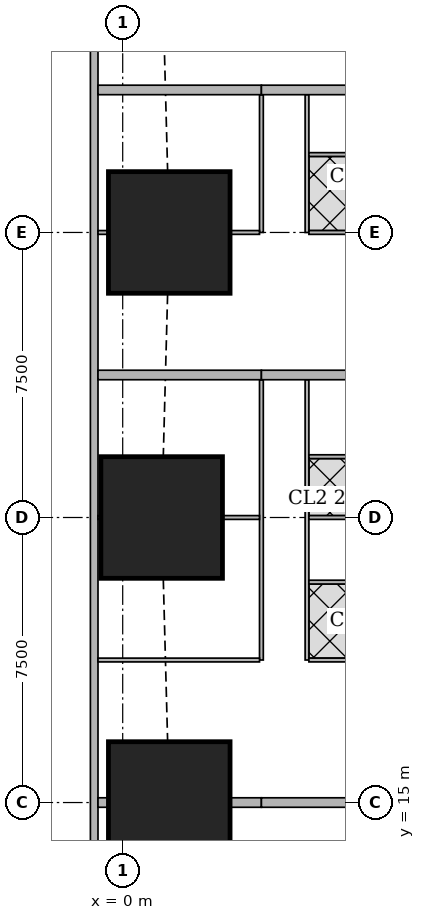
"""IFC4 building model, lengths in metres.
Left out: names, types, materials, properties, quantities, classifications, styles, units other than length and angle.
Written with IfcOpenShell. Run it as: python <this file> out.ifc"""

import sys

from ifc_helpers import new_model, si_unit, direction, frame, frame_2d, origin, origin_2d, place, context, subcontext, project, spatial, rectangle, extrude, element, fill, save


model = new_model("IFC4")
c1 = context("Model", 3, precision=1e-05, world=origin(), true_north=direction((0.0, 1.0)))
c2 = subcontext(c1, "Body", "Model", "MODEL_VIEW")
j1 = project(units=[si_unit("LENGTHUNIT", "METRE"), si_unit("PLANEANGLEUNIT", "RADIAN")], contexts=[c1])
p1 = place(None, origin())
s1 = spatial("IfcSite", under=j1, at=p1, CompositionType="ELEMENT")
p2 = place(p1, origin())
s2 = spatial("IfcBuilding", under=s1, at=p2, CompositionType="ELEMENT")
p3 = place(p2, frame((0.0, 0.0, 20.0)))
s3 = spatial("IfcBuildingStorey", under=s2, at=p3, CompositionType="ELEMENT", Elevation=20.0)
p4 = place(p3, frame((1.225, 15.0, 0.0), z_axis=(0.0, 0.0, 1.0), x_axis=(1.0, 0.0, 0.0)))
e1 = element("IfcColumn", 1, at=p4, inside=s3, PredefinedType="COLUMN", context=c2, shape_type="SweptSolid", body=[
    extrude(rectangle(XDim=3.2, YDim=3.2, at=origin_2d()), origin(), (0.0, 0.0, 1.0), 3.75),
])
p5 = place(p3, frame((1.025, 22.5, -0.3), z_axis=(0.0, 0.0, 1.0), x_axis=(1.0, 0.0, 0.0)))
e2 = element("IfcColumn", 2, at=p5, inside=s3, PredefinedType="COLUMN", context=c2, shape_type="SweptSolid", body=[
    extrude(rectangle(XDim=3.2, YDim=3.2, at=origin_2d()), origin(), (0.0, 0.0, 1.0), 4.05),
])
p6 = place(p3, frame((1.225, 30.0, 0.0), z_axis=(0.0, 0.0, 1.0), x_axis=(1.0, 0.0, 0.0)))
e3 = element("IfcColumn", 3, at=p6, inside=s3, PredefinedType="COLUMN", context=c2, shape_type="SweptSolid", body=[
    extrude(rectangle(XDim=3.2, YDim=3.2, at=origin_2d()), origin(), (0.0, 0.0, 1.0), 3.75),
])
p7 = place(p3, frame((-0.75, 42.837, 0.0), z_axis=(0.0, 0.0, 1.0), x_axis=(0.0, -1.0, 0.0)))
e4 = element("IfcWall", 4, at=p7, inside=s3, PredefinedType="SOLIDWALL", context=c2, shape_type="SweptSolid", body=[
    extrude(rectangle(XDim=40.674, YDim=0.2, at=frame_2d((20.337, 0.0))), origin(), (0.0, 0.0, 1.0), 3.5),
])
p8 = place(p7, frame((1.78, 0.0, 0.9)))
e5 = element("IfcOpeningElement", 5, at=p8, cuts=e4, PredefinedType="OPENING", context=c2, shape_type="SweptSolid", body=[
    extrude(rectangle(XDim=1.8, YDim=1.5, at=frame_2d((0.9, 0.75))), frame((0.0, 0.11, 0.0), z_axis=(0.0, -1.0, 0.0), x_axis=(1.0, 0.0, 0.0)), (0.0, 0.0, 1.0), 0.22),
])
p9 = place(p7, frame((6.312, 0.0, 0.9)))
e6 = element("IfcOpeningElement", 6, at=p9, cuts=e4, PredefinedType="OPENING", context=c2, shape_type="SweptSolid", body=[
    extrude(rectangle(XDim=1.8, YDim=1.5, at=frame_2d((0.9, 0.75))), frame((0.0, 0.11, 0.0), z_axis=(0.0, -1.0, 0.0), x_axis=(1.0, 0.0, 0.0)), (0.0, 0.0, 1.0), 0.22),
])
p10 = place(p7, frame((10.062, 0.0, 0.9)))
e7 = element("IfcOpeningElement", 7, at=p10, cuts=e4, PredefinedType="OPENING", context=c2, shape_type="SweptSolid", body=[
    extrude(rectangle(XDim=1.8, YDim=1.5, at=frame_2d((0.9, 0.75))), frame((0.0, 0.11, 0.0), z_axis=(0.0, -1.0, 0.0), x_axis=(1.0, 0.0, 0.0)), (0.0, 0.0, 1.0), 0.22),
])
p11 = place(p7, frame((13.812, 0.0, 0.9)))
e8 = element("IfcOpeningElement", 8, at=p11, cuts=e4, PredefinedType="OPENING", context=c2, shape_type="SweptSolid", body=[
    extrude(rectangle(XDim=1.8, YDim=1.5, at=frame_2d((0.9, 0.75))), frame((0.0, 0.11, 0.0), z_axis=(0.0, -1.0, 0.0), x_axis=(1.0, 0.0, 0.0)), (0.0, 0.0, 1.0), 0.22),
])
p12 = place(p7, frame((17.562, 0.0, 0.9)))
e9 = element("IfcOpeningElement", 9, at=p12, cuts=e4, PredefinedType="OPENING", context=c2, shape_type="SweptSolid", body=[
    extrude(rectangle(XDim=1.8, YDim=1.5, at=frame_2d((0.9, 0.75))), frame((0.0, 0.11, 0.0), z_axis=(0.0, -1.0, 0.0), x_axis=(1.0, 0.0, 0.0)), (0.0, 0.0, 1.0), 0.22),
])
p13 = place(p7, frame((21.312, 0.0, 0.9)))
e10 = element("IfcOpeningElement", 10, at=p13, cuts=e4, PredefinedType="OPENING", context=c2, shape_type="SweptSolid", body=[
    extrude(rectangle(XDim=1.8, YDim=1.5, at=frame_2d((0.9, 0.75))), frame((0.0, 0.11, 0.0), z_axis=(0.0, -1.0, 0.0), x_axis=(1.0, 0.0, 0.0)), (0.0, 0.0, 1.0), 0.22),
])
p14 = place(p7, frame((25.062, 0.0, 0.9)))
e11 = element("IfcOpeningElement", 11, at=p14, cuts=e4, PredefinedType="OPENING", context=c2, shape_type="SweptSolid", body=[
    extrude(rectangle(XDim=1.8, YDim=1.5, at=frame_2d((0.9, 0.75))), frame((0.0, 0.11, 0.0), z_axis=(0.0, -1.0, 0.0), x_axis=(1.0, 0.0, 0.0)), (0.0, 0.0, 1.0), 0.22),
])
p15 = place(p7, frame((28.812, 0.0, 0.9)))
e12 = element("IfcOpeningElement", 12, at=p15, cuts=e4, PredefinedType="OPENING", context=c2, shape_type="SweptSolid", body=[
    extrude(rectangle(XDim=1.8, YDim=1.5, at=frame_2d((0.9, 0.75))), frame((0.0, 0.11, 0.0), z_axis=(0.0, -1.0, 0.0), x_axis=(1.0, 0.0, 0.0)), (0.0, 0.0, 1.0), 0.22),
])
p16 = place(p7, frame((32.562, 0.0, 0.9)))
e13 = element("IfcOpeningElement", 13, at=p16, cuts=e4, PredefinedType="OPENING", context=c2, shape_type="SweptSolid", body=[
    extrude(rectangle(XDim=1.8, YDim=1.5, at=frame_2d((0.9, 0.75))), frame((0.0, 0.11, 0.0), z_axis=(0.0, -1.0, 0.0), x_axis=(1.0, 0.0, 0.0)), (0.0, 0.0, 1.0), 0.22),
])
p17 = place(p7, frame((37.094, 0.0, 0.9)))
e14 = element("IfcOpeningElement", 14, at=p17, cuts=e4, PredefinedType="OPENING", context=c2, shape_type="SweptSolid", body=[
    extrude(rectangle(XDim=1.8, YDim=1.5, at=frame_2d((0.9, 0.75))), frame((0.0, 0.11, 0.0), z_axis=(0.0, -1.0, 0.0), x_axis=(1.0, 0.0, 0.0)), (0.0, 0.0, 1.0), 0.22),
])
p18 = place(p3, frame((3.65, 18.75, 0.0), z_axis=(0.0, 0.0, 1.0), x_axis=(0.0, 1.0, 0.0)))
e15 = element("IfcWall", 15, at=p18, inside=s3, PredefinedType="PARTITIONING", context=c2, shape_type="SweptSolid", body=[
    extrude(rectangle(XDim=7.375, YDim=0.1, at=frame_2d((3.688, 0.0))), origin(), (0.0, 0.0, 1.0), 3.5),
])
p19 = place(p18, frame((0.2, 0.0, 0.0)))
e16 = element("IfcOpeningElement", 16, at=p19, cuts=e15, PredefinedType="OPENING", context=c2, shape_type="SweptSolid", body=[
    extrude(rectangle(XDim=0.9, YDim=2.1, at=frame_2d((0.45, 1.05))), frame((0.0, 0.06, 0.0), z_axis=(0.0, -1.0, 0.0), x_axis=(1.0, 0.0, 0.0)), (0.0, 0.0, 1.0), 0.12),
])
p20 = place(p18, frame((5.4, 0.0, 0.0)))
e17 = element("IfcOpeningElement", 17, at=p20, cuts=e15, PredefinedType="OPENING", context=c2, shape_type="SweptSolid", body=[
    extrude(rectangle(XDim=0.9, YDim=2.1, at=frame_2d((0.45, 1.05))), frame((0.0, 0.06, 0.0), z_axis=(0.0, -1.0, 0.0), x_axis=(1.0, 0.0, 0.0)), (0.0, 0.0, 1.0), 0.12),
])
p21 = place(p3, frame((4.85, 18.75, 0.0), z_axis=(0.0, 0.0, 1.0), x_axis=(0.0, 1.0, 0.0)))
e18 = element("IfcWall", 18, at=p21, inside=s3, PredefinedType="PARTITIONING", context=c2, shape_type="SweptSolid", body=[
    extrude(rectangle(XDim=7.375, YDim=0.1, at=frame_2d((3.688, 0.0))), origin(), (0.0, 0.0, 1.0), 3.5),
])
p22 = place(p21, frame((0.575, 0.0, 0.0)))
e19 = element("IfcOpeningElement", 19, at=p22, cuts=e18, PredefinedType="OPENING", context=c2, shape_type="SweptSolid", body=[
    extrude(rectangle(XDim=0.9, YDim=2.1, at=frame_2d((0.45, 1.05))), frame((0.0, 0.06, 0.0), z_axis=(0.0, -1.0, 0.0), x_axis=(1.0, 0.0, 0.0)), (0.0, 0.0, 1.0), 0.12),
])
p23 = place(p21, frame((4.1, 0.0, 0.0)))
e20 = element("IfcOpeningElement", 20, at=p23, cuts=e18, PredefinedType="OPENING", context=c2, shape_type="SweptSolid", body=[
    extrude(rectangle(XDim=0.9, YDim=2.1, at=frame_2d((0.45, 1.05))), frame((0.0, 0.06, 0.0), z_axis=(0.0, -1.0, 0.0), x_axis=(1.0, 0.0, 0.0)), (0.0, 0.0, 1.0), 0.12),
])
p24 = place(p21, frame((2.45, 0.0, 0.0)))
e21 = element("IfcOpeningElement", 21, at=p24, cuts=e18, PredefinedType="OPENING", context=c2, shape_type="SweptSolid", body=[
    extrude(rectangle(XDim=0.9, YDim=2.1, at=frame_2d((0.45, 1.05))), frame((0.0, 0.06, 0.0), z_axis=(0.0, -1.0, 0.0), x_axis=(1.0, 0.0, 0.0)), (0.0, 0.0, 1.0), 0.12),
])
p25 = place(p21, frame((5.975, 0.0, 0.0)))
e22 = element("IfcOpeningElement", 22, at=p25, cuts=e18, PredefinedType="OPENING", context=c2, shape_type="SweptSolid", body=[
    extrude(rectangle(XDim=0.9, YDim=2.1, at=frame_2d((0.45, 1.05))), frame((0.0, 0.06, 0.0), z_axis=(0.0, -1.0, 0.0), x_axis=(1.0, 0.0, 0.0)), (0.0, 0.0, 1.0), 0.12),
])
p26 = place(p3, frame((-0.65, 18.75, 0.0), z_axis=(0.0, 0.0, 1.0), x_axis=(1.0, 0.0, 0.0)))
e23 = element("IfcWall", 23, at=p26, inside=s3, PredefinedType="PARTITIONING", context=c2, shape_type="SweptSolid", body=[
    extrude(rectangle(XDim=4.25, YDim=0.1, at=frame_2d((2.125, 0.0))), origin(), (0.0, 0.0, 1.0), 2.05),
])
p27 = place(p3, frame((-0.65, 22.5, 0.0), z_axis=(0.0, 0.0, 1.0), x_axis=(1.0, 0.0, 0.0)))
e24 = element("IfcWall", 24, at=p27, inside=s3, PredefinedType="PARTITIONING", context=c2, shape_type="SweptSolid", body=[
    extrude(rectangle(XDim=0.074, YDim=0.1, at=frame_2d((0.037, 0.0))), origin(), (0.0, 0.0, 1.0), 3.5),
])
p28 = place(p3, frame((2.626, 22.5, 0.0), z_axis=(0.0, 0.0, 1.0), x_axis=(1.0, 0.0, 0.0)))
e25 = element("IfcWall", 25, at=p28, inside=s3, PredefinedType="PARTITIONING", context=c2, shape_type="SweptSolid", body=[
    extrude(rectangle(XDim=0.974, YDim=0.1, at=frame_2d((0.487, 0.0))), origin(), (0.0, 0.0, 1.0), 3.5),
])
p29 = place(p3, frame((4.9, 18.75, 0.0), z_axis=(0.0, 0.0, 1.0), x_axis=(1.0, 0.0, 0.0)))
e26 = element("IfcWall", 26, at=p29, inside=s3, PredefinedType="PARTITIONING", context=c2, shape_type="SweptSolid", body=[
    extrude(rectangle(XDim=3.525, YDim=0.1, at=frame_2d((1.763, 0.0))), origin(), (0.0, 0.0, 1.0), 3.5),
])
p30 = place(p3, frame((4.9, 22.5, 0.0), z_axis=(0.0, 0.0, 1.0), x_axis=(1.0, 0.0, 0.0)))
e27 = element("IfcWall", 27, at=p30, inside=s3, PredefinedType="PARTITIONING", context=c2, shape_type="SweptSolid", body=[
    extrude(rectangle(XDim=1.399, YDim=0.1, at=frame_2d((0.7, 0.0))), origin(), (0.0, 0.0, 1.0), 3.5),
])
for number, where, z_axis, x_axis in (
    (28, (4.9, 20.8, 0.0), (0.0, 0.0, 1.0), (1.0, 0.0, 0.0)),
    (29, (4.9, 24.1, 0.0), (0.0, 0.0, 1.0), (1.0, 0.0, 0.0)),
):
    element("IfcWall", number, at=place(p3, frame(where, z_axis=z_axis, x_axis=x_axis)), inside=s3, PredefinedType="PARTITIONING", context=c2, shape_type="SweptSolid", body=[
        extrude(rectangle(XDim=3.525, YDim=0.1, at=frame_2d((1.763, 0.0))), origin(), (0.0, 0.0, 1.0), 3.5),
    ])
p31 = place(p3, frame((-0.65, 15.0, 0.0), z_axis=(0.0, 0.0, 1.0), x_axis=(1.0, 0.0, 0.0)))
e30 = element("IfcWall", 30, at=p31, inside=s3, PredefinedType="SOLIDWALL", context=c2, shape_type="SweptSolid", body=[
    extrude(rectangle(XDim=0.274, YDim=0.25, at=frame_2d((0.137, 0.0))), origin(), (0.0, 0.0, 1.0), 2.05),
])
p32 = place(p3, frame((2.826, 15.0, 0.0), z_axis=(0.0, 0.0, 1.0), x_axis=(1.0, 0.0, 0.0)))
e31 = element("IfcWall", 31, at=p32, inside=s3, PredefinedType="SOLIDWALL", context=c2, shape_type="SweptSolid", body=[
    extrude(rectangle(XDim=0.824, YDim=0.25, at=frame_2d((0.412, 0.0))), origin(), (0.0, 0.0, 1.0), 2.05),
])
p33 = place(p3, frame((3.65, 15.0, 0.0), z_axis=(0.0, 0.0, 1.0), x_axis=(1.0, 0.0, 0.0)))
e32 = element("IfcWall", 32, at=p33, inside=s3, PredefinedType="SOLIDWALL", context=c2, shape_type="SweptSolid", body=[
    extrude(rectangle(XDim=2.649, YDim=0.25, at=frame_2d((1.325, 0.0))), origin(), (0.0, 0.0, 1.0), 3.5),
])
p34 = place(p3, frame((3.65, 30.0, 0.0), z_axis=(0.0, 0.0, 1.0), x_axis=(0.0, 1.0, 0.0)))
e33 = element("IfcWall", 33, at=p34, inside=s3, PredefinedType="PARTITIONING", context=c2, shape_type="SweptSolid", body=[
    extrude(rectangle(XDim=3.625, YDim=0.1, at=frame_2d((1.812, 0.0))), origin(), (0.0, 0.0, 1.0), 3.5),
])
p35 = place(p34, frame((1.65, 0.0, 0.0)))
e34 = element("IfcOpeningElement", 34, at=p35, cuts=e33, PredefinedType="OPENING", context=c2, shape_type="SweptSolid", body=[
    extrude(rectangle(XDim=0.9, YDim=2.1, at=frame_2d((0.45, 1.05))), frame((0.0, 0.06, 0.0), z_axis=(0.0, -1.0, 0.0), x_axis=(1.0, 0.0, 0.0)), (0.0, 0.0, 1.0), 0.12),
])
p36 = place(p3, frame((4.85, 30.0, 0.0), z_axis=(0.0, 0.0, 1.0), x_axis=(0.0, 1.0, 0.0)))
e35 = element("IfcWall", 35, at=p36, inside=s3, PredefinedType="PARTITIONING", context=c2, shape_type="SweptSolid", body=[
    extrude(rectangle(XDim=3.625, YDim=0.1, at=frame_2d((1.812, 0.0))), origin(), (0.0, 0.0, 1.0), 3.5),
])
p37 = place(p36, frame((0.575, 0.0, 0.0)))
e36 = element("IfcOpeningElement", 36, at=p37, cuts=e35, PredefinedType="OPENING", context=c2, shape_type="SweptSolid", body=[
    extrude(rectangle(XDim=0.9, YDim=2.1, at=frame_2d((0.45, 1.05))), frame((0.0, 0.06, 0.0), z_axis=(0.0, -1.0, 0.0), x_axis=(1.0, 0.0, 0.0)), (0.0, 0.0, 1.0), 0.12),
])
p38 = place(p36, frame((2.45, 0.0, 0.0)))
e37 = element("IfcOpeningElement", 37, at=p38, cuts=e35, PredefinedType="OPENING", context=c2, shape_type="SweptSolid", body=[
    extrude(rectangle(XDim=0.9, YDim=2.1, at=frame_2d((0.45, 1.05))), frame((0.0, 0.06, 0.0), z_axis=(0.0, -1.0, 0.0), x_axis=(1.0, 0.0, 0.0)), (0.0, 0.0, 1.0), 0.12),
])
p39 = place(p3, frame((-0.65, 30.0, 0.0), z_axis=(0.0, 0.0, 1.0), x_axis=(1.0, 0.0, 0.0)))
e38 = element("IfcWall", 38, at=p39, inside=s3, PredefinedType="PARTITIONING", context=c2, shape_type="SweptSolid", body=[
    extrude(rectangle(XDim=0.274, YDim=0.1, at=frame_2d((0.137, 0.0))), origin(), (0.0, 0.0, 1.0), 3.5),
])
p40 = place(p3, frame((2.826, 30.0, 0.0), z_axis=(0.0, 0.0, 1.0), x_axis=(1.0, 0.0, 0.0)))
e39 = element("IfcWall", 39, at=p40, inside=s3, PredefinedType="PARTITIONING", context=c2, shape_type="SweptSolid", body=[
    extrude(rectangle(XDim=0.774, YDim=0.1, at=frame_2d((0.387, 0.0))), origin(), (0.0, 0.0, 1.0), 3.5),
])
p41 = place(p3, frame((4.9, 30.0, 0.0), z_axis=(0.0, 0.0, 1.0), x_axis=(1.0, 0.0, 0.0)))
e40 = element("IfcWall", 40, at=p41, inside=s3, PredefinedType="PARTITIONING", context=c2, shape_type="SweptSolid", body=[
    extrude(rectangle(XDim=1.399, YDim=0.1, at=frame_2d((0.7, 0.0))), origin(), (0.0, 0.0, 1.0), 3.5),
])
p42 = place(p3, frame((4.9, 32.05, 0.0), z_axis=(0.0, 0.0, 1.0), x_axis=(1.0, 0.0, 0.0)))
e41 = element("IfcWall", 41, at=p42, inside=s3, PredefinedType="PARTITIONING", context=c2, shape_type="SweptSolid", body=[
    extrude(rectangle(XDim=3.525, YDim=0.1, at=frame_2d((1.763, 0.0))), origin(), (0.0, 0.0, 1.0), 3.5),
])
p43 = place(p3, frame((-0.65, 26.25, 0.0), z_axis=(0.0, 0.0, 1.0), x_axis=(1.0, 0.0, 0.0)))
e42 = element("IfcWall", 42, at=p43, inside=s3, PredefinedType="SOLIDWALL", context=c2, shape_type="SweptSolid", body=[
    extrude(rectangle(XDim=4.3, YDim=0.25, at=frame_2d((2.15, 0.0))), origin(), (0.0, 0.0, 1.0), 2.05),
])
p44 = place(p3, frame((3.65, 26.25, 0.0), z_axis=(0.0, 0.0, 1.0), x_axis=(1.0, 0.0, 0.0)))
e43 = element("IfcWall", 43, at=p44, inside=s3, PredefinedType="SOLIDWALL", context=c2, shape_type="SweptSolid", body=[
    extrude(rectangle(XDim=4.775, YDim=0.25, at=frame_2d((2.388, 0.0))), origin(), (0.0, 0.0, 1.0), 3.5),
])
p45 = place(p3, frame((-0.65, 33.75, 0.0), z_axis=(0.0, 0.0, 1.0), x_axis=(1.0, 0.0, 0.0)))
e44 = element("IfcWall", 44, at=p45, inside=s3, PredefinedType="SOLIDWALL", context=c2, shape_type="SweptSolid", body=[
    extrude(rectangle(XDim=4.3, YDim=0.25, at=frame_2d((2.15, 0.0))), origin(), (0.0, 0.0, 1.0), 2.05),
])
p46 = place(p3, frame((3.65, 33.75, 0.0), z_axis=(0.0, 0.0, 1.0), x_axis=(1.0, 0.0, 0.0)))
e45 = element("IfcWall", 45, at=p46, inside=s3, PredefinedType="SOLIDWALL", context=c2, shape_type="SweptSolid", body=[
    extrude(rectangle(XDim=4.775, YDim=0.25, at=frame_2d((2.388, 0.0))), origin(), (0.0, 0.0, 1.0), 3.5),
])
p47 = place(p9, origin())
e46 = element("IfcWindow", 46, at=p47, inside=s3, PartitioningType="SINGLE_PANEL", PredefinedType="WINDOW", context=c2, shape_type="SweptSolid", body=[
    extrude(rectangle(XDim=1.8, YDim=1.5, at=frame_2d((0.9, 0.75))), frame((0.0, 0.03, 0.0), z_axis=(0.0, -1.0, 0.0), x_axis=(1.0, 0.0, 0.0)), (0.0, 0.0, 1.0), 0.06),
])
fill(e6, e46)
p48 = place(p10, origin())
e47 = element("IfcWindow", 47, at=p48, inside=s3, PartitioningType="SINGLE_PANEL", PredefinedType="WINDOW", context=c2, shape_type="SweptSolid", body=[
    extrude(rectangle(XDim=1.8, YDim=1.5, at=frame_2d((0.9, 0.75))), frame((0.0, 0.03, 0.0), z_axis=(0.0, -1.0, 0.0), x_axis=(1.0, 0.0, 0.0)), (0.0, 0.0, 1.0), 0.06),
])
fill(e7, e47)
p49 = place(p11, origin())
e48 = element("IfcWindow", 48, at=p49, inside=s3, PartitioningType="SINGLE_PANEL", PredefinedType="WINDOW", context=c2, shape_type="SweptSolid", body=[
    extrude(rectangle(XDim=1.8, YDim=1.5, at=frame_2d((0.9, 0.75))), frame((0.0, 0.03, 0.0), z_axis=(0.0, -1.0, 0.0), x_axis=(1.0, 0.0, 0.0)), (0.0, 0.0, 1.0), 0.06),
])
fill(e8, e48)
p50 = place(p12, origin())
e49 = element("IfcWindow", 49, at=p50, inside=s3, PartitioningType="SINGLE_PANEL", PredefinedType="WINDOW", context=c2, shape_type="SweptSolid", body=[
    extrude(rectangle(XDim=1.8, YDim=1.5, at=frame_2d((0.9, 0.75))), frame((0.0, 0.03, 0.0), z_axis=(0.0, -1.0, 0.0), x_axis=(1.0, 0.0, 0.0)), (0.0, 0.0, 1.0), 0.06),
])
fill(e9, e49)
p51 = place(p13, origin())
e50 = element("IfcWindow", 50, at=p51, inside=s3, PartitioningType="SINGLE_PANEL", PredefinedType="WINDOW", context=c2, shape_type="SweptSolid", body=[
    extrude(rectangle(XDim=1.8, YDim=1.5, at=frame_2d((0.9, 0.75))), frame((0.0, 0.03, 0.0), z_axis=(0.0, -1.0, 0.0), x_axis=(1.0, 0.0, 0.0)), (0.0, 0.0, 1.0), 0.06),
])
fill(e10, e50)
p52 = place(p14, origin())
e51 = element("IfcWindow", 51, at=p52, inside=s3, PartitioningType="SINGLE_PANEL", PredefinedType="WINDOW", context=c2, shape_type="SweptSolid", body=[
    extrude(rectangle(XDim=1.8, YDim=1.5, at=frame_2d((0.9, 0.75))), frame((0.0, 0.03, 0.0), z_axis=(0.0, -1.0, 0.0), x_axis=(1.0, 0.0, 0.0)), (0.0, 0.0, 1.0), 0.06),
])
fill(e11, e51)
p53 = place(p15, origin())
e52 = element("IfcWindow", 52, at=p53, inside=s3, PartitioningType="SINGLE_PANEL", PredefinedType="WINDOW", context=c2, shape_type="SweptSolid", body=[
    extrude(rectangle(XDim=1.8, YDim=1.5, at=frame_2d((0.9, 0.75))), frame((0.0, 0.03, 0.0), z_axis=(0.0, -1.0, 0.0), x_axis=(1.0, 0.0, 0.0)), (0.0, 0.0, 1.0), 0.06),
])
fill(e12, e52)
p54 = place(p19, origin())
e53 = element("IfcDoor", 53, at=p54, inside=s3, OperationType="SINGLE_SWING_LEFT", PredefinedType="DOOR", context=c2, shape_type="SweptSolid", body=[
    extrude(rectangle(XDim=0.9, YDim=2.1, at=frame_2d((0.45, 1.05))), frame((0.0, 0.025, 0.0), z_axis=(0.0, -1.0, 0.0), x_axis=(1.0, 0.0, 0.0)), (0.0, 0.0, 1.0), 0.05),
])
fill(e16, e53)
p55 = place(p20, origin())
e54 = element("IfcDoor", 54, at=p55, inside=s3, OperationType="SINGLE_SWING_RIGHT", PredefinedType="DOOR", context=c2, shape_type="SweptSolid", body=[
    extrude(rectangle(XDim=0.9, YDim=2.1, at=frame_2d((0.45, 1.05))), frame((0.0, 0.025, 0.0), z_axis=(0.0, -1.0, 0.0), x_axis=(1.0, 0.0, 0.0)), (0.0, 0.0, 1.0), 0.05),
])
fill(e17, e54)
p56 = place(p22, origin())
e55 = element("IfcDoor", 55, at=p56, inside=s3, OperationType="SINGLE_SWING_RIGHT", PredefinedType="DOOR", context=c2, shape_type="SweptSolid", body=[
    extrude(rectangle(XDim=0.9, YDim=2.1, at=frame_2d((0.45, 1.05))), frame((0.0, 0.025, 0.0), z_axis=(0.0, -1.0, 0.0), x_axis=(1.0, 0.0, 0.0)), (0.0, 0.0, 1.0), 0.05),
])
fill(e19, e55)
p57 = place(p23, origin())
e56 = element("IfcDoor", 56, at=p57, inside=s3, OperationType="SINGLE_SWING_RIGHT", PredefinedType="DOOR", context=c2, shape_type="SweptSolid", body=[
    extrude(rectangle(XDim=0.9, YDim=2.1, at=frame_2d((0.45, 1.05))), frame((0.0, 0.025, 0.0), z_axis=(0.0, -1.0, 0.0), x_axis=(1.0, 0.0, 0.0)), (0.0, 0.0, 1.0), 0.05),
])
fill(e20, e56)
p58 = place(p24, origin())
e57 = element("IfcDoor", 57, at=p58, inside=s3, OperationType="SINGLE_SWING_RIGHT", PredefinedType="DOOR", context=c2, shape_type="SweptSolid", body=[
    extrude(rectangle(XDim=0.9, YDim=2.1, at=frame_2d((0.45, 1.05))), frame((0.0, 0.025, 0.0), z_axis=(0.0, -1.0, 0.0), x_axis=(1.0, 0.0, 0.0)), (0.0, 0.0, 1.0), 0.05),
])
fill(e21, e57)
p59 = place(p25, origin())
e58 = element("IfcDoor", 58, at=p59, inside=s3, OperationType="SINGLE_SWING_LEFT", PredefinedType="DOOR", context=c2, shape_type="SweptSolid", body=[
    extrude(rectangle(XDim=0.9, YDim=2.1, at=frame_2d((0.45, 1.05))), frame((0.0, 0.025, 0.0), z_axis=(0.0, -1.0, 0.0), x_axis=(1.0, 0.0, 0.0)), (0.0, 0.0, 1.0), 0.05),
])
fill(e22, e58)
p60 = place(p35, origin())
e59 = element("IfcDoor", 59, at=p60, inside=s3, OperationType="SINGLE_SWING_RIGHT", PredefinedType="DOOR", context=c2, shape_type="SweptSolid", body=[
    extrude(rectangle(XDim=0.9, YDim=2.1, at=frame_2d((0.45, 1.05))), frame((0.0, 0.025, 0.0), z_axis=(0.0, -1.0, 0.0), x_axis=(1.0, 0.0, 0.0)), (0.0, 0.0, 1.0), 0.05),
])
fill(e34, e59)
p61 = place(p37, origin())
e60 = element("IfcDoor", 60, at=p61, inside=s3, OperationType="SINGLE_SWING_RIGHT", PredefinedType="DOOR", context=c2, shape_type="SweptSolid", body=[
    extrude(rectangle(XDim=0.9, YDim=2.1, at=frame_2d((0.45, 1.05))), frame((0.0, 0.025, 0.0), z_axis=(0.0, -1.0, 0.0), x_axis=(1.0, 0.0, 0.0)), (0.0, 0.0, 1.0), 0.05),
])
fill(e36, e60)
p62 = place(p38, origin())
e61 = element("IfcDoor", 61, at=p62, inside=s3, OperationType="SINGLE_SWING_LEFT", PredefinedType="DOOR", context=c2, shape_type="SweptSolid", body=[
    extrude(rectangle(XDim=0.9, YDim=2.1, at=frame_2d((0.45, 1.05))), frame((0.0, 0.025, 0.0), z_axis=(0.0, -1.0, 0.0), x_axis=(1.0, 0.0, 0.0)), (0.0, 0.0, 1.0), 0.05),
])
fill(e37, e61)
save(model, sys.argv[1])
